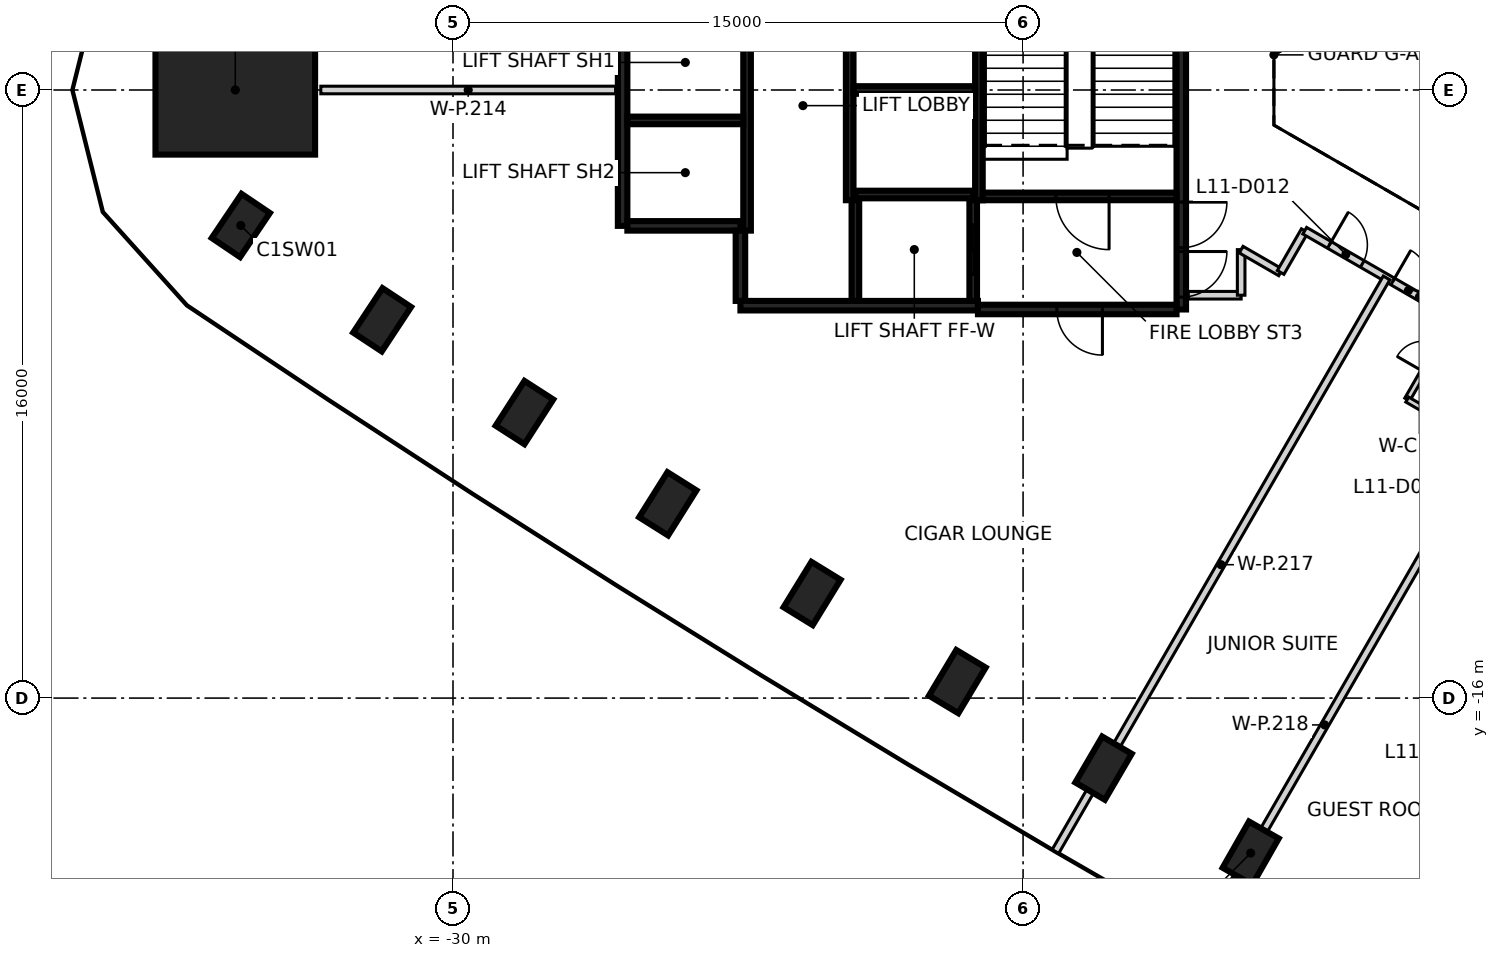
"""IFC4 building model, lengths in metres.
Left out: names, types, materials, properties, quantities, classifications, styles, units other than length and angle.
Written with IfcOpenShell. Run it as: python <this file> out.ifc"""

import sys

from ifc_helpers import new_model, si_unit, direction, frame, frame_2d, origin, origin_2d, place, context, subcontext, project, spatial, rectangle, extrude, element, fill, save


model = new_model("IFC4")
c1 = context("Model", 3, precision=1e-05, world=origin(), true_north=direction((0.0, 1.0)))
c2 = subcontext(c1, "Body", "Model", "MODEL_VIEW")
j1 = project(units=[si_unit("LENGTHUNIT", "METRE"), si_unit("PLANEANGLEUNIT", "RADIAN")], contexts=[c1])
p1 = place(None, origin())
s1 = spatial("IfcSite", under=j1, at=p1, CompositionType="ELEMENT")
p2 = place(p1, origin())
s2 = spatial("IfcBuilding", under=s1, at=p2, CompositionType="ELEMENT")
p3 = place(p2, frame((0.0, 0.0, 53.0)))
s3 = spatial("IfcBuildingStorey", under=s2, at=p3, CompositionType="ELEMENT", Elevation=53.0)
for number, where, z_axis, x_axis in (
    (1, (-35.583, -3.565, -0.475), (0.0, 0.0, 1.0), (0.559, 0.829, 0.0)),
    (2, (-31.865, -6.046, -0.475), (0.0, 0.0, 1.0), (0.551, 0.835, 0.0)),
    (3, (-28.12, -8.488, -0.475), (0.0, 0.0, 1.0), (0.541, 0.841, 0.0)),
    (4, (-24.349, -10.888, -0.475), (0.0, 0.0, 1.0), (0.532, 0.846, 0.0)),
    (5, (-20.552, -13.248, -0.475), (0.0, 0.0, 1.0), (0.523, 0.852, 0.0)),
    (6, (-16.73, -15.566, -0.475), (0.0, 0.0, 1.0), (0.514, 0.858, 0.0)),
    (7, (-12.883, -17.844, -0.475), (0.0, 0.0, 1.0), (0.505, 0.863, 0.0)),
    (8, (-9.011, -20.079, -0.475), (0.0, 0.0, 1.0), (0.495, 0.869, 0.0)),
):
    element("IfcColumn", number, at=place(p3, frame(where, z_axis=z_axis, x_axis=x_axis)), inside=s3, PredefinedType="COLUMN", context=c2, shape_type="SweptSolid", body=[
        extrude(rectangle(XDim=1.4, YDim=0.9, at=origin_2d()), origin(), (0.0, 0.0, 1.0), 3.6),
    ])
p4 = place(p3, frame((-35.729, 0.0, -0.475), z_axis=(0.0, 0.0, 1.0), x_axis=(1.0, 0.0, 0.0)))
e9 = element("IfcColumn", 9, at=p4, inside=s3, PredefinedType="COLUMN", context=c2, shape_type="SweptSolid", body=[
    extrude(rectangle(XDim=4.2, YDim=3.4, at=origin_2d()), origin(), (0.0, 0.0, 1.0), 3.6),
])
p5 = place(p3, frame((-10.837, 5.775, 0.0), z_axis=(0.0, 0.0, 1.0), x_axis=(0.0, -1.0, 0.0)))
e10 = element("IfcWall", 10, at=p5, inside=s3, PredefinedType="SHEAR", context=c2, shape_type="SweptSolid", body=[
    extrude(rectangle(XDim=11.55, YDim=0.25, at=frame_2d((5.775, 0.0))), origin(), (0.0, 0.0, 1.0), 3.125),
])
p6 = place(p5, frame((10.025, 0.0, 0.0)))
e11 = element("IfcOpeningElement", 11, at=p6, cuts=e10, PredefinedType="OPENING", context=c2, shape_type="SweptSolid", body=[
    extrude(rectangle(XDim=1.2, YDim=2.1, at=frame_2d((0.6, 1.05))), frame((0.0, 0.135, 0.0), z_axis=(0.0, -1.0, 0.0), x_axis=(1.0, 0.0, 0.0)), (0.0, 0.0, 1.0), 0.27),
])
p7 = place(p5, frame((8.725, 0.0, 0.0)))
e12 = element("IfcOpeningElement", 12, at=p7, cuts=e10, PredefinedType="OPENING", context=c2, shape_type="SweptSolid", body=[
    extrude(rectangle(XDim=1.2, YDim=2.1, at=frame_2d((0.6, 1.05))), frame((0.0, 0.135, 0.0), z_axis=(0.0, -1.0, 0.0), x_axis=(1.0, 0.0, 0.0)), (0.0, 0.0, 1.0), 0.27),
])
p8 = place(p3, frame((-16.187, -5.675, 0.0), z_axis=(0.0, 0.0, 1.0), x_axis=(-1.0, 0.0, 0.0)))
e13 = element("IfcWall", 13, at=p8, inside=s3, PredefinedType="SHEAR", context=c2, shape_type="SweptSolid", body=[
    extrude(rectangle(XDim=6.25, YDim=0.25, at=frame_2d((3.125, 0.0))), origin(), (0.0, 0.0, 1.0), 3.125),
])
p9 = place(p3, frame((-25.537, -3.575, 0.0), z_axis=(0.0, 0.0, 1.0), x_axis=(0.0, 1.0, 0.0)))
e14 = element("IfcWall", 14, at=p9, inside=s3, PredefinedType="SHEAR", context=c2, shape_type="SweptSolid", body=[
    extrude(rectangle(XDim=5.85, YDim=0.25, at=frame_2d((2.925, 0.0))), origin(), (0.0, 0.0, 1.0), 3.125),
])
p10 = place(p3, frame((-10.963, -5.775, 0.0), z_axis=(0.0, 0.0, 1.0), x_axis=(-1.0, 0.0, 0.0)))
e15 = element("IfcWall", 15, at=p10, inside=s3, PredefinedType="SHEAR", context=c2, shape_type="SweptSolid", body=[
    extrude(rectangle(XDim=5.225, YDim=0.25, at=frame_2d((2.612, 0.0))), origin(), (0.0, 0.0, 1.0), 3.125),
])
p11 = place(p10, frame((1.95, 0.0, 0.0)))
e16 = element("IfcOpeningElement", 16, at=p11, cuts=e15, PredefinedType="OPENING", context=c2, shape_type="SweptSolid", body=[
    extrude(rectangle(XDim=1.2, YDim=2.1, at=frame_2d((0.6, 1.05))), frame((0.0, 0.135, 0.0), z_axis=(0.0, -1.0, 0.0), x_axis=(1.0, 0.0, 0.0)), (0.0, 0.0, 1.0), 0.27),
])
p12 = place(p3, frame((-22.437, -3.575, 0.0), z_axis=(0.0, 0.0, 1.0), x_axis=(-1.0, 0.0, 0.0)))
e17 = element("IfcWall", 17, at=p12, inside=s3, PredefinedType="SHEAR", context=c2, shape_type="SweptSolid", body=[
    extrude(rectangle(XDim=2.975, YDim=0.25, at=frame_2d((1.487, 0.0))), origin(), (0.0, 0.0, 1.0), 3.125),
])
p13 = place(p3, frame((-22.437, -5.55, 0.0), z_axis=(0.0, 0.0, 1.0), x_axis=(0.0, 1.0, 0.0)))
e18 = element("IfcWall", 18, at=p13, inside=s3, PredefinedType="SHEAR", context=c2, shape_type="SweptSolid", body=[
    extrude(rectangle(XDim=1.849, YDim=0.25, at=frame_2d((0.925, 0.0))), origin(), (0.0, 0.0, 1.0), 3.125),
])
p14 = place(p3, frame((-16.162, 2.951, 0.0), z_axis=(0.0, 0.0, 1.0), x_axis=(0.0, -1.0, 0.0)))
e19 = element("IfcWall", 19, at=p14, inside=s3, PredefinedType="SHEAR", context=c2, shape_type="SweptSolid", body=[
    extrude(rectangle(XDim=5.851, YDim=0.2, at=frame_2d((2.925, 0.0))), origin(), (0.0, 0.0, 1.0), 3.125),
])
for number, where, z_axis, x_axis in (
    (20, (-19.562, -2.9, 0.0), (0.0, 0.0, 1.0), (0.0, 1.0, 0.0)),
    (21, (-22.262, 2.4, 0.0), (0.0, 0.0, 1.0), (0.0, -1.0, 0.0)),
):
    element("IfcWall", number, at=place(p3, frame(where, z_axis=z_axis, x_axis=x_axis)), inside=s3, PredefinedType="SHEAR", context=c2, shape_type="SweptSolid", body=[
        extrude(rectangle(XDim=6.1, YDim=0.2, at=frame_2d((3.05, 0.0))), origin(), (0.0, 0.0, 1.0), 3.125),
    ])
p15 = place(p3, frame((-10.963, -2.8, 0.0), z_axis=(0.0, 0.0, 1.0), x_axis=(-1.0, 0.0, 0.0)))
e22 = element("IfcWall", 22, at=p15, inside=s3, PredefinedType="SHEAR", context=c2, shape_type="SweptSolid", body=[
    extrude(rectangle(XDim=5.098, YDim=0.2, at=frame_2d((2.549, 0.0))), origin(), (0.0, 0.0, 1.0), 3.125),
])
p16 = place(p15, frame((1.774, 0.0, 0.0)))
e23 = element("IfcOpeningElement", 23, at=p16, cuts=e22, PredefinedType="OPENING", context=c2, shape_type="SweptSolid", body=[
    extrude(rectangle(XDim=1.4, YDim=2.1, at=frame_2d((0.7, 1.05))), frame((0.0, 0.11, 0.0), z_axis=(0.0, -1.0, 0.0), x_axis=(1.0, 0.0, 0.0)), (0.0, 0.0, 1.0), 0.22),
])
p17 = place(p3, frame((-16.263, 0.0, 0.0), z_axis=(0.0, 0.0, 1.0), x_axis=(-1.0, 0.0, 0.0)))
e24 = element("IfcWall", 24, at=p17, inside=s3, PredefinedType="SHEAR", context=c2, shape_type="SweptSolid", body=[
    extrude(rectangle(XDim=3.198, YDim=0.2, at=frame_2d((1.599, 0.0))), origin(), (0.0, 0.0, 1.0), 3.125),
])
p18 = place(p3, frame((-22.363, -0.8, 0.0), z_axis=(0.0, 0.0, 1.0), x_axis=(-1.0, 0.0, 0.0)))
e25 = element("IfcWall", 25, at=p18, inside=s3, PredefinedType="SHEAR", context=c2, shape_type="SweptSolid", body=[
    extrude(rectangle(XDim=3.048, YDim=0.2, at=frame_2d((1.524, 0.0))), origin(), (0.0, 0.0, 1.0), 3.125),
])
p19 = place(p3, frame((-19.412, -2.75, 0.0), z_axis=(0.0, 0.0, 1.0), x_axis=(1.0, 0.0, 0.0)))
e26 = element("IfcWall", 26, at=p19, inside=s3, PredefinedType="SHEAR", context=c2, shape_type="SweptSolid", body=[
    extrude(rectangle(XDim=3.1, YDim=0.2, at=frame_2d((1.55, 0.0))), origin(), (0.0, 0.0, 1.0), 3.125),
])
p20 = place(p3, frame((-16.312, -2.898, 0.0), z_axis=(0.0, 0.0, 1.0), x_axis=(0.0, -1.0, 0.0)))
e27 = element("IfcWall", 27, at=p20, inside=s3, PredefinedType="SHEAR", context=c2, shape_type="SweptSolid", body=[
    extrude(rectangle(XDim=2.651, YDim=0.2, at=frame_2d((1.325, 0.0))), origin(), (0.0, 0.0, 1.0), 3.125),
])
p21 = place(p20, frame((0.652, 0.0, 0.0)))
e28 = element("IfcOpeningElement", 28, at=p21, cuts=e27, PredefinedType="OPENING", context=c2, shape_type="SweptSolid", body=[
    extrude(rectangle(XDim=1.3, YDim=2.1, at=frame_2d((0.65, 1.05))), frame((0.0, 0.11, 0.0), z_axis=(0.0, -1.0, 0.0), x_axis=(1.0, 0.0, 0.0)), (0.0, 0.0, 1.0), 0.22),
])
p22 = place(p3, frame((-19.412, -5.549, 0.0), z_axis=(0.0, 0.0, 1.0), x_axis=(0.0, 1.0, 0.0)))
e29 = element("IfcWall", 29, at=p22, inside=s3, PredefinedType="SHEAR", context=c2, shape_type="SweptSolid", body=[
    extrude(rectangle(XDim=2.651, YDim=0.2, at=frame_2d((1.325, 0.0))), origin(), (0.0, 0.0, 1.0), 3.125),
])
p23 = place(p3, frame((-10.652, -5.4, 0.0), z_axis=(0.0, 0.0, 1.0), x_axis=(1.0, 0.0, 0.0)))
e30 = element("IfcWall", 30, at=p23, inside=s3, PredefinedType="PARTITIONING", context=c2, shape_type="SweptSolid", body=[
    extrude(rectangle(XDim=1.39, YDim=0.2, at=frame_2d((0.695, 0.0))), origin(), (0.0, 0.0, 1.0), 3.125),
])
for number, where, z_axis, x_axis in (
    (31, (-9.262, -5.4, 0.0), (0.0, 0.0, 1.0), (0.0, 1.0, 0.0)),
    (32, (-9.262, -4.2, 0.0), (0.0, 0.0, 1.0), (0.866, -0.5, 0.0)),
):
    element("IfcWall", number, at=place(p3, frame(where, z_axis=z_axis, x_axis=x_axis)), inside=s3, PredefinedType="PARTITIONING", context=c2, shape_type="SweptSolid", body=[
        extrude(rectangle(XDim=1.2, YDim=0.2, at=frame_2d((0.6, 0.0))), origin(), (0.0, 0.0, 1.0), 3.125),
    ])
p24 = place(p3, frame((-8.223, -4.8, 0.0), z_axis=(0.0, 0.0, 1.0), x_axis=(0.499866914522, 0.866102227088, 0.0)))
e33 = element("IfcWall", 33, at=p24, inside=s3, PredefinedType="PARTITIONING", context=c2, shape_type="SweptSolid", body=[
    extrude(rectangle(XDim=1.268, YDim=0.2, at=frame_2d((0.634, 0.0))), origin(), (0.0, 0.0, 1.0), 3.125),
])
p25 = place(p3, frame((-7.589, -3.702, 0.0), z_axis=(0.0, 0.0, 1.0), x_axis=(0.865994210678, -0.500054024153, 0.0)))
e34 = element("IfcWall", 34, at=p25, inside=s3, PredefinedType="PARTITIONING", context=c2, shape_type="SweptSolid", body=[
    extrude(rectangle(XDim=6.969, YDim=0.2, at=frame_2d((3.484, 0.0))), origin(), (0.0, 0.0, 1.0), 3.125),
])
p26 = place(p25, frame((0.749, 0.0, 0.0)))
e35 = element("IfcOpeningElement", 35, at=p26, cuts=e34, PredefinedType="OPENING", context=c2, shape_type="SweptSolid", body=[
    extrude(rectangle(XDim=1.0, YDim=2.1, at=frame_2d((0.5, 1.05))), frame((0.0, 0.11, 0.0), z_axis=(0.0, -1.0, 0.0), x_axis=(1.0, 0.0, 0.0)), (0.0, 0.0, 1.0), 0.22),
])
p27 = place(p25, frame((2.674, 0.0, 0.0)))
e36 = element("IfcOpeningElement", 36, at=p27, cuts=e34, PredefinedType="OPENING", context=c2, shape_type="SweptSolid", body=[
    extrude(rectangle(XDim=0.95, YDim=2.1, at=frame_2d((0.475, 1.05))), frame((0.0, 0.11, 0.0), z_axis=(0.0, -1.0, 0.0), x_axis=(1.0, 0.0, 0.0)), (0.0, 0.0, 1.0), 0.22),
])
p28 = place(p3, frame((-33.478, 0.0, 0.0), z_axis=(0.0, 0.0, 1.0), x_axis=(1.0, 0.0, 0.0)))
e37 = element("IfcWall", 37, at=p28, inside=s3, PredefinedType="PARTITIONING", context=c2, shape_type="SweptSolid", body=[
    extrude(rectangle(XDim=7.756, YDim=0.2, at=frame_2d((3.878, 0.0))), origin(), (0.0, 0.0, 1.0), 3.125),
])
p29 = place(p3, frame((-14.148, -20.035, 0.0), z_axis=(0.0, 0.0, 1.0), x_axis=(0.499978771293, 0.866037659837, 0.0)))
e38 = element("IfcWall", 38, at=p29, inside=s3, PredefinedType="PARTITIONING", context=c2, shape_type="SweptSolid", body=[
    extrude(rectangle(XDim=17.425, YDim=0.2, at=frame_2d((8.712, 0.0))), origin(), (0.0, 0.0, 1.0), 3.125),
])
p30 = place(p3, frame((-10.276, -22.271, 0.0), z_axis=(0.0, 0.0, 1.0), x_axis=(0.499984478165, 0.866034365135, 0.0)))
e39 = element("IfcWall", 39, at=p30, inside=s3, PredefinedType="PARTITIONING", context=c2, shape_type="SweptSolid", body=[
    extrude(rectangle(XDim=12.851, YDim=0.2, at=frame_2d((6.426, 0.0))), origin(), (0.0, 0.0, 1.0), 3.125),
])
p31 = place(p3, frame((-6.381, -24.464, 0.0), z_axis=(0.0, 0.0, 1.0), x_axis=(0.500007577232, 0.866021029023, 0.0)))
e40 = element("IfcWall", 40, at=p31, inside=s3, PredefinedType="PARTITIONING", context=c2, shape_type="SweptSolid", body=[
    extrude(rectangle(XDim=9.883, YDim=0.2, at=frame_2d((4.941, 0.0))), origin(), (0.0, 0.0, 1.0), 3.125),
])
p32 = place(p3, frame((-4.892, -8.145, 0.0), z_axis=(0.0, 0.0, 1.0), x_axis=(0.499711178953, 0.866192090491, 0.0)))
e41 = element("IfcWall", 41, at=p32, inside=s3, PredefinedType="PARTITIONING", context=c2, shape_type="SweptSolid", body=[
    extrude(rectangle(XDim=2.5, YDim=0.15, at=frame_2d((1.25, 0.0))), origin(), (0.0, 0.0, 1.0), 3.125),
])
p33 = place(p32, frame((0.85, 0.0, 0.0)))
e42 = element("IfcOpeningElement", 42, at=p33, cuts=e41, PredefinedType="OPENING", context=c2, shape_type="SweptSolid", body=[
    extrude(rectangle(XDim=0.8, YDim=2.1, at=frame_2d((0.4, 1.05))), frame((0.0, 0.085, 0.0), z_axis=(0.0, -1.0, 0.0), x_axis=(1.0, 0.0, 0.0)), (0.0, 0.0, 1.0), 0.17),
])
p34 = place(p3, frame((-4.892, -8.145, 0.0), z_axis=(0.0, 0.0, 1.0), x_axis=(0.865999212041, -0.500045362686, 0.0)))
e43 = element("IfcWall", 43, at=p34, inside=s3, PredefinedType="PARTITIONING", context=c2, shape_type="SweptSolid", body=[
    extrude(rectangle(XDim=2.4, YDim=0.15, at=frame_2d((1.2, 0.0))), origin(), (0.0, 0.0, 1.0), 3.125),
])
p35 = place(p21, origin())
e44 = element("IfcDoor", 44, at=p35, inside=s3, OperationType="SLIDING_TO_LEFT", PredefinedType="DOOR", context=c2, shape_type="SweptSolid", body=[
    extrude(rectangle(XDim=1.3, YDim=2.1, at=frame_2d((0.65, 1.05))), frame((0.0, 0.025, 0.0), z_axis=(0.0, -1.0, 0.0), x_axis=(1.0, 0.0, 0.0)), (0.0, 0.0, 1.0), 0.05),
])
fill(e28, e44)
p36 = place(p6, origin())
e45 = element("IfcDoor", 45, at=p36, inside=s3, OperationType="SINGLE_SWING_LEFT", PredefinedType="DOOR", context=c2, shape_type="SweptSolid", body=[
    extrude(rectangle(XDim=1.2, YDim=2.1, at=frame_2d((0.6, 1.05))), frame((0.0, 0.025, 0.0), z_axis=(0.0, -1.0, 0.0), x_axis=(1.0, 0.0, 0.0)), (0.0, 0.0, 1.0), 0.05),
])
fill(e11, e45)
p37 = place(p7, origin())
e46 = element("IfcDoor", 46, at=p37, inside=s3, OperationType="SINGLE_SWING_RIGHT", PredefinedType="DOOR", context=c2, shape_type="SweptSolid", body=[
    extrude(rectangle(XDim=1.2, YDim=2.1, at=frame_2d((0.6, 1.05))), frame((0.0, 0.025, 0.0), z_axis=(0.0, -1.0, 0.0), x_axis=(1.0, 0.0, 0.0)), (0.0, 0.0, 1.0), 0.05),
])
fill(e12, e46)
p38 = place(p16, origin())
e47 = element("IfcDoor", 47, at=p38, inside=s3, OperationType="SINGLE_SWING_LEFT", PredefinedType="DOOR", context=c2, shape_type="SweptSolid", body=[
    extrude(rectangle(XDim=1.4, YDim=2.1, at=frame_2d((0.7, 1.05))), frame((0.0, 0.025, 0.0), z_axis=(0.0, -1.0, 0.0), x_axis=(1.0, 0.0, 0.0)), (0.0, 0.0, 1.0), 0.05),
])
fill(e23, e47)
p39 = place(p11, origin())
e48 = element("IfcDoor", 48, at=p39, inside=s3, OperationType="SINGLE_SWING_RIGHT", PredefinedType="DOOR", context=c2, shape_type="SweptSolid", body=[
    extrude(rectangle(XDim=1.2, YDim=2.1, at=frame_2d((0.6, 1.05))), frame((0.0, 0.025, 0.0), z_axis=(0.0, -1.0, 0.0), x_axis=(1.0, 0.0, 0.0)), (0.0, 0.0, 1.0), 0.05),
])
fill(e16, e48)
p40 = place(p26, frame((1.0, 0.0, 0.0), z_axis=(0.0, 0.0, 1.0), x_axis=(-1.0, 0.0, 0.0)))
e49 = element("IfcDoor", 49, at=p40, inside=s3, OperationType="SINGLE_SWING_LEFT", PredefinedType="DOOR", context=c2, shape_type="SweptSolid", body=[
    extrude(rectangle(XDim=1.0, YDim=2.1, at=frame_2d((0.5, 1.05))), frame((0.0, 0.025, 0.0), z_axis=(0.0, -1.0, 0.0), x_axis=(1.0, 0.0, 0.0)), (0.0, 0.0, 1.0), 0.05),
])
fill(e35, e49)
p41 = place(p27, frame((0.95, 0.0, 0.0), z_axis=(0.0, 0.0, 1.0), x_axis=(-1.0, 0.0, 0.0)))
e50 = element("IfcDoor", 50, at=p41, inside=s3, OperationType="SINGLE_SWING_LEFT", PredefinedType="DOOR", context=c2, shape_type="SweptSolid", body=[
    extrude(rectangle(XDim=0.95, YDim=2.1, at=frame_2d((0.475, 1.05))), frame((0.0, 0.025, 0.0), z_axis=(0.0, -1.0, 0.0), x_axis=(1.0, 0.0, 0.0)), (0.0, 0.0, 1.0), 0.05),
])
fill(e36, e50)
save(model, sys.argv[1])
